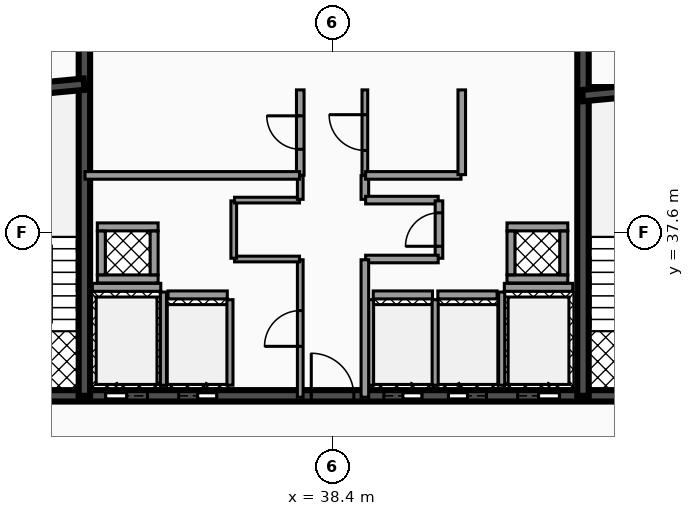
"""IFC4 building model, lengths in metres.
Left out: names, types, materials, properties, quantities, classifications, styles, units other than length and angle.
Written with IfcOpenShell. Run it as: python <this file> out.ifc"""

import sys

from ifc_helpers import new_model, si_unit, direction, frame, frame_2d, origin, place, context, subcontext, project, spatial, rectangle, extrude, element, fill, save


model = new_model("IFC4")
c1 = context("Model", 3, precision=1e-05, world=origin(), true_north=direction((0.0, 1.0)))
c2 = subcontext(c1, "Body", "Model", "MODEL_VIEW")
j1 = project(units=[si_unit("LENGTHUNIT", "METRE"), si_unit("PLANEANGLEUNIT", "RADIAN")], contexts=[c1])
p1 = place(None, origin())
s1 = spatial("IfcSite", under=j1, at=p1, CompositionType="ELEMENT")
p2 = place(p1, origin())
s2 = spatial("IfcBuilding", under=s1, at=p2, CompositionType="ELEMENT")
p3 = place(p2, frame((0.0, 0.0, 242.76)))
s3 = spatial("IfcBuildingStorey", under=s2, at=p3, CompositionType="ELEMENT", Elevation=242.76)
p4 = place(p3, frame((28.5, 33.3, 0.0), z_axis=(0.0, 0.0, 1.0), x_axis=(1.0, 0.0, 0.0)))
e1 = element("IfcWall", 1, at=p4, inside=s3, PredefinedType="SHEAR", context=c2, shape_type="SweptSolid", body=[
    extrude(rectangle(XDim=19.86, YDim=0.3, at=frame_2d((9.93, 0.0))), origin(), (0.0, 0.0, 1.0), 3.18),
])
p5 = place(p4, frame((3.93, 0.0, 0.0)))
e2 = element("IfcOpeningElement", 2, at=p5, cuts=e1, PredefinedType="OPENING", context=c2, shape_type="SweptSolid", body=[
    extrude(rectangle(XDim=1.1, YDim=2.15, at=frame_2d((0.55, 1.075))), frame((0.0, 0.16, 0.0), z_axis=(0.0, -1.0, 0.0), x_axis=(1.0, 0.0, 0.0)), (0.0, 0.0, 1.0), 0.32),
])
p6 = place(p4, frame((14.77, 0.0, 0.0)))
e3 = element("IfcOpeningElement", 3, at=p6, cuts=e1, PredefinedType="OPENING", context=c2, shape_type="SweptSolid", body=[
    extrude(rectangle(XDim=1.1, YDim=2.15, at=frame_2d((0.55, 1.075))), frame((0.0, 0.16, 0.0), z_axis=(0.0, -1.0, 0.0), x_axis=(1.0, 0.0, 0.0)), (0.0, 0.0, 1.0), 0.32),
])
p7 = place(p4, frame((11.25, 0.0, 0.0)))
e4 = element("IfcOpeningElement", 4, at=p7, cuts=e1, PredefinedType="OPENING", context=c2, shape_type="SweptSolid", body=[
    extrude(rectangle(XDim=1.0, YDim=2.1, at=frame_2d((0.5, 1.05))), frame((0.0, 0.16, 0.0), z_axis=(0.0, -1.0, 0.0), x_axis=(1.0, 0.0, 0.0)), (0.0, 0.0, 1.0), 0.32),
])
p8 = place(p4, frame((12.95, 0.0, 0.0)))
e5 = element("IfcOpeningElement", 5, at=p8, cuts=e1, PredefinedType="OPENING", context=c2, shape_type="SweptSolid", body=[
    extrude(rectangle(XDim=1.0, YDim=2.1, at=frame_2d((0.5, 1.05))), frame((0.0, 0.16, 0.0), z_axis=(0.0, -1.0, 0.0), x_axis=(1.0, 0.0, 0.0)), (0.0, 0.0, 1.0), 0.32),
])
p9 = place(p4, frame((5.85, 0.0, 0.0)))
e6 = element("IfcOpeningElement", 6, at=p9, cuts=e1, PredefinedType="OPENING", context=c2, shape_type="SweptSolid", body=[
    extrude(rectangle(XDim=1.0, YDim=2.1, at=frame_2d((0.5, 1.05))), frame((0.0, 0.16, 0.0), z_axis=(0.0, -1.0, 0.0), x_axis=(1.0, 0.0, 0.0)), (0.0, 0.0, 1.0), 0.32),
])
p10 = place(p4, frame((1.21, 0.0, 0.0)))
e7 = element("IfcOpeningElement", 7, at=p10, cuts=e1, PredefinedType="OPENING", context=c2, shape_type="SweptSolid", body=[
    extrude(rectangle(XDim=1.1, YDim=2.2, at=frame_2d((0.55, 1.1))), frame((0.0, 0.16, 0.0), z_axis=(0.0, -1.0, 0.0), x_axis=(1.0, 0.0, 0.0)), (0.0, 0.0, 1.0), 0.32),
])
p11 = place(p4, frame((9.34, 0.0, 0.0)))
e8 = element("IfcOpeningElement", 8, at=p11, cuts=e1, PredefinedType="OPENING", context=c2, shape_type="SweptSolid", body=[
    extrude(rectangle(XDim=1.12, YDim=2.05, at=frame_2d((0.56, 1.025))), frame((0.0, 0.16, 0.0), z_axis=(0.0, -1.0, 0.0), x_axis=(1.0, 0.0, 0.0)), (0.0, 0.0, 1.0), 0.32),
])
p12 = place(p4, frame((17.55, 0.0, 0.0)))
e9 = element("IfcOpeningElement", 9, at=p12, cuts=e1, PredefinedType="OPENING", context=c2, shape_type="SweptSolid", body=[
    extrude(rectangle(XDim=1.1, YDim=2.2, at=frame_2d((0.55, 1.1))), frame((0.0, 0.16, 0.0), z_axis=(0.0, -1.0, 0.0), x_axis=(1.0, 0.0, 0.0)), (0.0, 0.0, 1.0), 0.32),
])
for number, where, z_axis, x_axis in (
    (10, (31.87, 33.3, 0.0), (0.0, 0.0, 1.0), (0.0, 1.0, 0.0)),
    (11, (44.99, 33.3, 0.0), (0.0, 0.0, 1.0), (0.0, 1.0, 0.0)),
):
    element("IfcWall", number, at=place(p3, frame(where, z_axis=z_axis, x_axis=x_axis)), inside=s3, PredefinedType="SHEAR", context=c2, shape_type="SweptSolid", body=[
        extrude(rectangle(XDim=10.1, YDim=0.3, at=frame_2d((5.05, 0.0))), origin(), (0.0, 0.0, 1.0), 3.18),
    ])
p13 = place(p3, frame((28.64, 41.2, 0.0), z_axis=(0.0, 0.0, 1.0), x_axis=(0.995687118776, 0.092774789157, 0.0)))
e12 = element("IfcWall", 12, at=p13, inside=s3, PredefinedType="SHEAR", context=c2, shape_type="SweptSolid", body=[
    extrude(rectangle(XDim=3.234, YDim=0.3, at=frame_2d((1.617, 0.0))), origin(), (0.0, 0.0, 1.0), 3.18),
])
p14 = place(p3, frame((44.98, 41.2, 0.0), z_axis=(0.0, 0.0, 1.0), x_axis=(0.995686468965, 0.09278176286, 0.0)))
e13 = element("IfcWall", 13, at=p14, inside=s3, PredefinedType="SHEAR", context=c2, shape_type="SweptSolid", body=[
    extrude(rectangle(XDim=3.234, YDim=0.3, at=frame_2d((1.617, 0.0))), origin(), (0.0, 0.0, 1.0), 3.18),
])
p15 = place(p3, frame((32.08, 36.155, 0.0), z_axis=(0.0, 0.0, 1.0), x_axis=(1.0, 0.0, 0.0)))
e14 = element("IfcWall", 14, at=p15, inside=s3, PredefinedType="SOLIDWALL", context=c2, shape_type="SweptSolid", body=[
    extrude(rectangle(XDim=1.8, YDim=0.21, at=frame_2d((0.9, 0.0))), origin(), (0.0, 0.0, 1.0), 3.18),
])
p16 = place(p3, frame((33.95, 33.58, 0.0), z_axis=(0.0, 0.0, 1.0), x_axis=(0.0, 1.0, 0.0)))
e15 = element("IfcWall", 15, at=p16, inside=s3, PredefinedType="SOLIDWALL", context=c2, shape_type="SweptSolid", body=[
    extrude(rectangle(XDim=2.45, YDim=0.16, at=frame_2d((1.225, 0.0))), origin(), (0.0, 0.0, 1.0), 3.18),
])
p17 = place(p3, frame((42.92, 36.155, 0.0), z_axis=(0.0, 0.0, 1.0), x_axis=(1.0, 0.0, 0.0)))
e16 = element("IfcWall", 16, at=p17, inside=s3, PredefinedType="SOLIDWALL", context=c2, shape_type="SweptSolid", body=[
    extrude(rectangle(XDim=1.8, YDim=0.21, at=frame_2d((0.9, 0.0))), origin(), (0.0, 0.0, 1.0), 3.18),
])
p18 = place(p3, frame((42.85, 33.58, 0.0), z_axis=(0.0, 0.0, 1.0), x_axis=(0.0, 1.0, 0.0)))
e17 = element("IfcWall", 17, at=p18, inside=s3, PredefinedType="SOLIDWALL", context=c2, shape_type="SweptSolid", body=[
    extrude(rectangle(XDim=2.45, YDim=0.16, at=frame_2d((1.225, 0.0))), origin(), (0.0, 0.0, 1.0), 3.18),
])
p19 = place(p3, frame((39.47, 35.955, 0.0), z_axis=(0.0, 0.0, 1.0), x_axis=(1.0, 0.0, 0.0)))
e18 = element("IfcWall", 18, at=p19, inside=s3, PredefinedType="SOLIDWALL", context=c2, shape_type="SweptSolid", body=[
    extrude(rectangle(XDim=1.56, YDim=0.21, at=frame_2d((0.78, 0.0))), origin(), (0.0, 0.0, 1.0), 3.18),
])
for number, where, z_axis, x_axis in (
    (19, (39.4, 33.58, 0.0), (0.0, 0.0, 1.0), (0.0, 1.0, 0.0)),
    (20, (41.1, 33.58, 0.0), (0.0, 0.0, 1.0), (0.0, 1.0, 0.0)),
):
    element("IfcWall", number, at=place(p3, frame(where, z_axis=z_axis, x_axis=x_axis)), inside=s3, PredefinedType="SOLIDWALL", context=c2, shape_type="SweptSolid", body=[
        extrude(rectangle(XDim=2.25, YDim=0.16, at=frame_2d((1.125, 0.0))), origin(), (0.0, 0.0, 1.0), 3.18),
    ])
p20 = place(p3, frame((41.17, 35.955, 0.0), z_axis=(0.0, 0.0, 1.0), x_axis=(1.0, 0.0, 0.0)))
e21 = element("IfcWall", 21, at=p20, inside=s3, PredefinedType="SOLIDWALL", context=c2, shape_type="SweptSolid", body=[
    extrude(rectangle(XDim=1.56, YDim=0.21, at=frame_2d((0.78, 0.0))), origin(), (0.0, 0.0, 1.0), 3.18),
])
p21 = place(p3, frame((34.07, 35.955, 0.0), z_axis=(0.0, 0.0, 1.0), x_axis=(1.0, 0.0, 0.0)))
e22 = element("IfcWall", 22, at=p21, inside=s3, PredefinedType="SOLIDWALL", context=c2, shape_type="SweptSolid", body=[
    extrude(rectangle(XDim=1.56, YDim=0.21, at=frame_2d((0.78, 0.0))), origin(), (0.0, 0.0, 1.0), 3.18),
])
p22 = place(p3, frame((35.7, 33.58, 0.0), z_axis=(0.0, 0.0, 1.0), x_axis=(0.0, 1.0, 0.0)))
e23 = element("IfcWall", 23, at=p22, inside=s3, PredefinedType="SOLIDWALL", context=c2, shape_type="SweptSolid", body=[
    extrude(rectangle(XDim=2.25, YDim=0.16, at=frame_2d((1.125, 0.0))), origin(), (0.0, 0.0, 1.0), 3.18),
])
for number, where, z_axis, x_axis in (
    (24, (32.21, 36.375, 0.0), (0.0, 0.0, 1.0), (1.0, 0.0, 0.0)),
    (25, (32.21, 37.745, 0.0), (0.0, 0.0, 1.0), (1.0, 0.0, 0.0)),
):
    element("IfcWall", number, at=place(p3, frame(where, z_axis=z_axis, x_axis=x_axis)), inside=s3, PredefinedType="SOLIDWALL", context=c2, shape_type="SweptSolid", body=[
        extrude(rectangle(XDim=1.6, YDim=0.21, at=frame_2d((0.8, 0.0))), origin(), (0.0, 0.0, 1.0), 3.18),
    ])
for number, where, z_axis, x_axis in (
    (26, (32.315, 36.485, 0.0), (0.0, 0.0, 1.0), (0.0, 1.0, 0.0)),
    (27, (33.705, 36.485, 0.0), (0.0, 0.0, 1.0), (0.0, 1.0, 0.0)),
):
    element("IfcWall", number, at=place(p3, frame(where, z_axis=z_axis, x_axis=x_axis)), inside=s3, PredefinedType="SOLIDWALL", context=c2, shape_type="SweptSolid", body=[
        extrude(rectangle(XDim=1.15, YDim=0.21, at=frame_2d((0.575, 0.0))), origin(), (0.0, 0.0, 1.0), 3.18),
    ])
for number, where, z_axis, x_axis in (
    (28, (42.99, 36.375, 0.0), (0.0, 0.0, 1.0), (1.0, 0.0, 0.0)),
    (29, (42.99, 37.745, 0.0), (0.0, 0.0, 1.0), (1.0, 0.0, 0.0)),
):
    element("IfcWall", number, at=place(p3, frame(where, z_axis=z_axis, x_axis=x_axis)), inside=s3, PredefinedType="SOLIDWALL", context=c2, shape_type="SweptSolid", body=[
        extrude(rectangle(XDim=1.6, YDim=0.21, at=frame_2d((0.8, 0.0))), origin(), (0.0, 0.0, 1.0), 3.18),
    ])
for number, where, z_axis, x_axis in (
    (30, (43.095, 36.485, 0.0), (0.0, 0.0, 1.0), (0.0, 1.0, 0.0)),
    (31, (44.485, 36.485, 0.0), (0.0, 0.0, 1.0), (0.0, 1.0, 0.0)),
):
    element("IfcWall", number, at=place(p3, frame(where, z_axis=z_axis, x_axis=x_axis)), inside=s3, PredefinedType="SOLIDWALL", context=c2, shape_type="SweptSolid", body=[
        extrude(rectangle(XDim=1.15, YDim=0.21, at=frame_2d((0.575, 0.0))), origin(), (0.0, 0.0, 1.0), 3.18),
    ])
p23 = place(p3, frame((37.55, 33.265, 0.0), z_axis=(0.0, 0.0, 1.0), x_axis=(0.0, 1.0, 0.0)))
e32 = element("IfcWall", 32, at=p23, inside=s3, PredefinedType="PARTITIONING", context=c2, shape_type="SweptSolid", body=[
    extrude(rectangle(XDim=3.615, YDim=0.15, at=frame_2d((1.808, 0.0))), origin(), (0.0, 0.0, 1.0), 2.235),
])
p24 = place(p23, frame((1.337, 0.0, 0.0)))
e33 = element("IfcOpeningElement", 33, at=p24, cuts=e32, PredefinedType="OPENING", context=c2, shape_type="SweptSolid", body=[
    extrude(rectangle(XDim=0.94, YDim=2.05, at=frame_2d((0.47, 1.025))), frame((0.0, 0.085, 0.0), z_axis=(0.0, -1.0, 0.0), x_axis=(1.0, 0.0, 0.0)), (0.0, 0.0, 1.0), 0.17),
])
p25 = place(p3, frame((35.82, 36.9, 0.0), z_axis=(0.0, 0.0, 1.0), x_axis=(1.0, 0.0, 0.0)))
e34 = element("IfcWall", 34, at=p25, inside=s3, PredefinedType="PARTITIONING", context=c2, shape_type="SweptSolid", body=[
    extrude(rectangle(XDim=1.71, YDim=0.15, at=frame_2d((0.855, 0.0))), origin(), (0.0, 0.0, 1.0), 2.235),
])
p26 = place(p3, frame((35.8, 36.92, 0.0), z_axis=(0.0, 0.0, 1.0), x_axis=(0.0, 1.0, 0.0)))
e35 = element("IfcWall", 35, at=p26, inside=s3, PredefinedType="PARTITIONING", context=c2, shape_type="SweptSolid", body=[
    extrude(rectangle(XDim=1.51, YDim=0.15, at=frame_2d((0.755, 0.0))), origin(), (0.0, 0.0, 1.0), 2.235),
])
p27 = place(p3, frame((35.82, 38.45, 0.0), z_axis=(0.0, 0.0, 1.0), x_axis=(1.0, 0.0, 0.0)))
e36 = element("IfcWall", 36, at=p27, inside=s3, PredefinedType="PARTITIONING", context=c2, shape_type="SweptSolid", body=[
    extrude(rectangle(XDim=1.71, YDim=0.15, at=frame_2d((0.855, 0.0))), origin(), (0.0, 0.0, 1.0), 2.235),
])
p28 = place(p3, frame((37.55, 38.47, 0.0), z_axis=(0.0, 0.0, 1.0), x_axis=(0.0, 1.0, 0.0)))
e37 = element("IfcWall", 37, at=p28, inside=s3, PredefinedType="PARTITIONING", context=c2, shape_type="SweptSolid", body=[
    extrude(rectangle(XDim=0.625, YDim=0.15, at=frame_2d((0.312, 0.0))), origin(), (0.0, 0.0, 1.0), 2.235),
])
p29 = place(p3, frame((37.55, 39.105, 0.0), z_axis=(0.0, 0.0, 1.0), x_axis=(0.0, 1.0, 0.0)))
e38 = element("IfcWall", 38, at=p29, inside=s3, PredefinedType="PARTITIONING", context=c2, shape_type="SweptSolid", body=[
    extrude(rectangle(XDim=2.245, YDim=0.2, at=frame_2d((1.123, 0.0))), origin(), (0.0, 0.0, 1.0), 2.235),
])
p30 = place(p29, frame((0.683, 0.0, 0.0)))
e39 = element("IfcOpeningElement", 39, at=p30, cuts=e38, PredefinedType="OPENING", context=c2, shape_type="SweptSolid", body=[
    extrude(rectangle(XDim=0.88, YDim=2.05, at=frame_2d((0.44, 1.025))), frame((0.0, 0.11, 0.0), z_axis=(0.0, -1.0, 0.0), x_axis=(1.0, 0.0, 0.0)), (0.0, 0.0, 1.0), 0.22),
])
p31 = place(p3, frame((39.25, 38.47, 0.0), z_axis=(0.0, 0.0, 1.0), x_axis=(0.0, 1.0, 0.0)))
e40 = element("IfcWall", 40, at=p31, inside=s3, PredefinedType="PARTITIONING", context=c2, shape_type="SweptSolid", body=[
    extrude(rectangle(XDim=0.625, YDim=0.2, at=frame_2d((0.312, 0.0))), origin(), (0.0, 0.0, 1.0), 2.235),
])
p32 = place(p3, frame((39.27, 38.45, 0.0), z_axis=(0.0, 0.0, 1.0), x_axis=(1.0, 0.0, 0.0)))
e41 = element("IfcWall", 41, at=p32, inside=s3, PredefinedType="PARTITIONING", context=c2, shape_type="SweptSolid", body=[
    extrude(rectangle(XDim=1.91, YDim=0.2, at=frame_2d((0.955, 0.0))), origin(), (0.0, 0.0, 1.0), 2.235),
])
p33 = place(p3, frame((41.2, 36.92, 0.0), z_axis=(0.0, 0.0, 1.0), x_axis=(0.0, 1.0, 0.0)))
e42 = element("IfcWall", 42, at=p33, inside=s3, PredefinedType="PARTITIONING", context=c2, shape_type="SweptSolid", body=[
    extrude(rectangle(XDim=1.51, YDim=0.2, at=frame_2d((0.755, 0.0))), origin(), (0.0, 0.0, 1.0), 2.235),
])
p34 = place(p33, frame((0.315, 0.0, 0.0)))
e43 = element("IfcOpeningElement", 43, at=p34, cuts=e42, PredefinedType="OPENING", context=c2, shape_type="SweptSolid", body=[
    extrude(rectangle(XDim=0.88, YDim=2.05, at=frame_2d((0.44, 1.025))), frame((0.0, 0.11, 0.0), z_axis=(0.0, -1.0, 0.0), x_axis=(1.0, 0.0, 0.0)), (0.0, 0.0, 1.0), 0.22),
])
p35 = place(p3, frame((39.27, 36.9, 0.0), z_axis=(0.0, 0.0, 1.0), x_axis=(1.0, 0.0, 0.0)))
e44 = element("IfcWall", 44, at=p35, inside=s3, PredefinedType="PARTITIONING", context=c2, shape_type="SweptSolid", body=[
    extrude(rectangle(XDim=1.91, YDim=0.2, at=frame_2d((0.955, 0.0))), origin(), (0.0, 0.0, 1.0), 2.235),
])
p36 = place(p3, frame((39.25, 33.265, 0.0), z_axis=(0.0, 0.0, 1.0), x_axis=(0.0, 1.0, 0.0)))
e45 = element("IfcWall", 45, at=p36, inside=s3, PredefinedType="PARTITIONING", context=c2, shape_type="SweptSolid", body=[
    extrude(rectangle(XDim=3.615, YDim=0.2, at=frame_2d((1.808, 0.0))), origin(), (0.0, 0.0, 1.0), 2.235),
])
p37 = place(p3, frame((39.25, 39.105, 0.0), z_axis=(0.0, 0.0, 1.0), x_axis=(0.0, 1.0, 0.0)))
e46 = element("IfcWall", 46, at=p37, inside=s3, PredefinedType="PARTITIONING", context=c2, shape_type="SweptSolid", body=[
    extrude(rectangle(XDim=2.245, YDim=0.15, at=frame_2d((1.123, 0.0))), origin(), (0.0, 0.0, 1.0), 2.235),
])
p38 = place(p37, frame((0.653, 0.0, 0.0)))
e47 = element("IfcOpeningElement", 47, at=p38, cuts=e46, PredefinedType="OPENING", context=c2, shape_type="SweptSolid", body=[
    extrude(rectangle(XDim=0.94, YDim=2.05, at=frame_2d((0.47, 1.025))), frame((0.0, 0.085, 0.0), z_axis=(0.0, -1.0, 0.0), x_axis=(1.0, 0.0, 0.0)), (0.0, 0.0, 1.0), 0.17),
])
p39 = place(p3, frame((31.885, 39.1, 0.0), z_axis=(0.0, 0.0, 1.0), x_axis=(1.0, 0.0, 0.0)))
e48 = element("IfcWall", 48, at=p39, inside=s3, PredefinedType="PARTITIONING", context=c2, shape_type="SweptSolid", body=[
    extrude(rectangle(XDim=5.645, YDim=0.2, at=frame_2d((2.823, 0.0))), origin(), (0.0, 0.0, 1.0), 2.235),
])
p40 = place(p3, frame((39.27, 39.1, 0.0), z_axis=(0.0, 0.0, 1.0), x_axis=(1.0, 0.0, 0.0)))
e49 = element("IfcWall", 49, at=p40, inside=s3, PredefinedType="PARTITIONING", context=c2, shape_type="SweptSolid", body=[
    extrude(rectangle(XDim=2.51, YDim=0.2, at=frame_2d((1.255, 0.0))), origin(), (0.0, 0.0, 1.0), 2.235),
])
p41 = place(p3, frame((41.8, 39.12, 0.0), z_axis=(0.0, 0.0, 1.0), x_axis=(0.0, 1.0, 0.0)))
e50 = element("IfcWall", 50, at=p41, inside=s3, PredefinedType="PARTITIONING", context=c2, shape_type="SweptSolid", body=[
    extrude(rectangle(XDim=2.23, YDim=0.2, at=frame_2d((1.115, 0.0))), origin(), (0.0, 0.0, 1.0), 2.235),
])
p42 = place(p5, origin())
e51 = element("IfcDoor", 51, at=p42, inside=s3, OperationType="SLIDING_TO_LEFT", PredefinedType="DOOR", context=c2, shape_type="SweptSolid", body=[
    extrude(rectangle(XDim=1.1, YDim=2.15, at=frame_2d((0.55, 1.075))), frame((0.0, 0.025, 0.0), z_axis=(0.0, -1.0, 0.0), x_axis=(1.0, 0.0, 0.0)), (0.0, 0.0, 1.0), 0.05),
])
fill(e2, e51)
p43 = place(p6, origin())
e52 = element("IfcDoor", 52, at=p43, inside=s3, OperationType="SLIDING_TO_RIGHT", PredefinedType="DOOR", context=c2, shape_type="SweptSolid", body=[
    extrude(rectangle(XDim=1.1, YDim=2.15, at=frame_2d((0.55, 1.075))), frame((0.0, 0.025, 0.0), z_axis=(0.0, -1.0, 0.0), x_axis=(1.0, 0.0, 0.0)), (0.0, 0.0, 1.0), 0.05),
])
fill(e3, e52)
p44 = place(p7, origin())
e53 = element("IfcDoor", 53, at=p44, inside=s3, OperationType="SLIDING_TO_RIGHT", PredefinedType="DOOR", context=c2, shape_type="SweptSolid", body=[
    extrude(rectangle(XDim=1.0, YDim=2.1, at=frame_2d((0.5, 1.05))), frame((0.0, 0.025, 0.0), z_axis=(0.0, -1.0, 0.0), x_axis=(1.0, 0.0, 0.0)), (0.0, 0.0, 1.0), 0.05),
])
fill(e4, e53)
p45 = place(p8, origin())
e54 = element("IfcDoor", 54, at=p45, inside=s3, OperationType="SLIDING_TO_LEFT", PredefinedType="DOOR", context=c2, shape_type="SweptSolid", body=[
    extrude(rectangle(XDim=1.0, YDim=2.1, at=frame_2d((0.5, 1.05))), frame((0.0, 0.025, 0.0), z_axis=(0.0, -1.0, 0.0), x_axis=(1.0, 0.0, 0.0)), (0.0, 0.0, 1.0), 0.05),
])
fill(e5, e54)
p46 = place(p9, origin())
e55 = element("IfcDoor", 55, at=p46, inside=s3, OperationType="SLIDING_TO_RIGHT", PredefinedType="DOOR", context=c2, shape_type="SweptSolid", body=[
    extrude(rectangle(XDim=1.0, YDim=2.1, at=frame_2d((0.5, 1.05))), frame((0.0, 0.025, 0.0), z_axis=(0.0, -1.0, 0.0), x_axis=(1.0, 0.0, 0.0)), (0.0, 0.0, 1.0), 0.05),
])
fill(e6, e55)
p47 = place(p11, origin())
e56 = element("IfcDoor", 56, at=p47, inside=s3, OperationType="SINGLE_SWING_LEFT", PredefinedType="DOOR", context=c2, shape_type="SweptSolid", body=[
    extrude(rectangle(XDim=1.12, YDim=2.05, at=frame_2d((0.56, 1.025))), frame((0.0, 0.025, 0.0), z_axis=(0.0, -1.0, 0.0), x_axis=(1.0, 0.0, 0.0)), (0.0, 0.0, 1.0), 0.05),
])
fill(e8, e56)
p48 = place(p24, origin())
e57 = element("IfcDoor", 57, at=p48, inside=s3, OperationType="SINGLE_SWING_LEFT", PredefinedType="DOOR", context=c2, shape_type="SweptSolid", body=[
    extrude(rectangle(XDim=0.94, YDim=2.05, at=frame_2d((0.47, 1.025))), frame((0.0, 0.025, 0.0), z_axis=(0.0, -1.0, 0.0), x_axis=(1.0, 0.0, 0.0)), (0.0, 0.0, 1.0), 0.05),
])
fill(e33, e57)
p49 = place(p30, origin())
e58 = element("IfcDoor", 58, at=p49, inside=s3, OperationType="SINGLE_SWING_RIGHT", PredefinedType="DOOR", context=c2, shape_type="SweptSolid", body=[
    extrude(rectangle(XDim=0.88, YDim=2.05, at=frame_2d((0.44, 1.025))), frame((0.0, 0.025, 0.0), z_axis=(0.0, -1.0, 0.0), x_axis=(1.0, 0.0, 0.0)), (0.0, 0.0, 1.0), 0.05),
])
fill(e39, e58)
p50 = place(p34, origin())
e59 = element("IfcDoor", 59, at=p50, inside=s3, OperationType="SINGLE_SWING_LEFT", PredefinedType="DOOR", context=c2, shape_type="SweptSolid", body=[
    extrude(rectangle(XDim=0.88, YDim=2.05, at=frame_2d((0.44, 1.025))), frame((0.0, 0.025, 0.0), z_axis=(0.0, -1.0, 0.0), x_axis=(1.0, 0.0, 0.0)), (0.0, 0.0, 1.0), 0.05),
])
fill(e43, e59)
p51 = place(p38, origin())
e60 = element("IfcDoor", 60, at=p51, inside=s3, OperationType="SINGLE_SWING_RIGHT", PredefinedType="DOOR", context=c2, shape_type="SweptSolid", body=[
    extrude(rectangle(XDim=0.94, YDim=2.05, at=frame_2d((0.47, 1.025))), frame((0.0, 0.025, 0.0), z_axis=(0.0, -1.0, 0.0), x_axis=(1.0, 0.0, 0.0)), (0.0, 0.0, 1.0), 0.05),
])
fill(e47, e60)
save(model, sys.argv[1])
